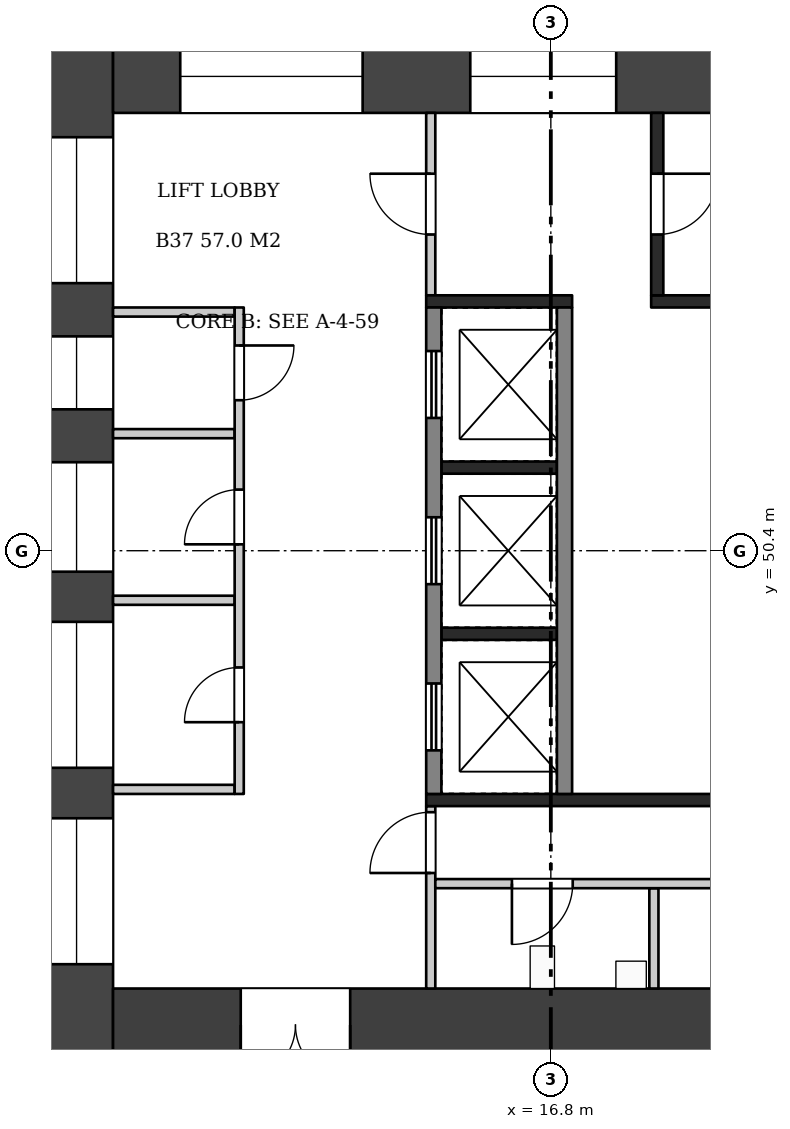
"""IFC4 building model, lengths in metres.
Left out: names, types, materials, properties, quantities, classifications, styles, units other than length and angle.
Written with IfcOpenShell. Run it as: python <this file> out.ifc"""

import sys

from ifc_helpers import new_model, si_unit, direction, frame, frame_2d, origin, place, context, subcontext, project, spatial, rectangle, extrude, element, fill, save


model = new_model("IFC4")
c1 = context("Model", 3, precision=1e-05, world=origin(), true_north=direction((0.0, 1.0)))
c2 = subcontext(c1, "Body", "Model", "MODEL_VIEW")
j1 = project(units=[si_unit("LENGTHUNIT", "METRE"), si_unit("PLANEANGLEUNIT", "RADIAN")], contexts=[c1])
p1 = place(None, origin())
s1 = spatial("IfcSite", under=j1, at=p1, CompositionType="ELEMENT")
p2 = place(p1, origin())
s2 = spatial("IfcBuilding", under=s1, at=p2, CompositionType="ELEMENT")
p3 = place(p2, frame((0.0, 0.0, 147.7)))
s3 = spatial("IfcBuildingStorey", under=s2, at=p3, CompositionType="ELEMENT", Elevation=147.7)
p4 = place(p3, frame((9.0, 58.8, 0.0), z_axis=(0.0, 0.0, 1.0), x_axis=(0.0, -1.0, 0.0)))
e1 = element("IfcWall", 1, at=p4, inside=s3, PredefinedType="SHEAR", context=c2, shape_type="SweptSolid", body=[
    extrude(rectangle(XDim=16.8, YDim=1.2, at=frame_2d((8.4, 0.0))), origin(), (0.0, 0.0, 1.0), 3.22),
])
p5 = place(p4, frame((1.6, 0.0, 0.6)))
e2 = element("IfcOpeningElement", 2, at=p5, cuts=e1, PredefinedType="OPENING", context=c2, shape_type="SweptSolid", body=[
    extrude(rectangle(XDim=2.4, YDim=2.1, at=frame_2d((1.2, 1.05))), frame((0.0, 0.61, 0.0), z_axis=(0.0, -1.0, 0.0), x_axis=(1.0, 0.0, 0.0)), (0.0, 0.0, 1.0), 1.22),
])
p6 = place(p4, frame((4.875, 0.0, 1.6)))
e3 = element("IfcOpeningElement", 3, at=p6, cuts=e1, PredefinedType="OPENING", context=c2, shape_type="SweptSolid", body=[
    extrude(rectangle(XDim=1.2, YDim=1.2, at=frame_2d((0.6, 0.6))), frame((0.0, 0.61, 0.0), z_axis=(0.0, -1.0, 0.0), x_axis=(1.0, 0.0, 0.0)), (0.0, 0.0, 1.0), 1.22),
])
p7 = place(p4, frame((6.945, 0.0, 1.6)))
e4 = element("IfcOpeningElement", 4, at=p7, cuts=e1, PredefinedType="OPENING", context=c2, shape_type="SweptSolid", body=[
    extrude(rectangle(XDim=1.8, YDim=1.2, at=frame_2d((0.9, 0.6))), frame((0.0, 0.61, 0.0), z_axis=(0.0, -1.0, 0.0), x_axis=(1.0, 0.0, 0.0)), (0.0, 0.0, 1.0), 1.22),
])
p8 = place(p4, frame((9.57, 0.0, 1.6)))
e5 = element("IfcOpeningElement", 5, at=p8, cuts=e1, PredefinedType="OPENING", context=c2, shape_type="SweptSolid", body=[
    extrude(rectangle(XDim=2.4, YDim=1.2, at=frame_2d((1.2, 0.6))), frame((0.0, 0.61, 0.0), z_axis=(0.0, -1.0, 0.0), x_axis=(1.0, 0.0, 0.0)), (0.0, 0.0, 1.0), 1.22),
])
p9 = place(p4, frame((12.8, 0.0, 0.6)))
e6 = element("IfcOpeningElement", 6, at=p9, cuts=e1, PredefinedType="OPENING", context=c2, shape_type="SweptSolid", body=[
    extrude(rectangle(XDim=2.4, YDim=2.1, at=frame_2d((1.2, 1.05))), frame((0.0, 0.61, 0.0), z_axis=(0.0, -1.0, 0.0), x_axis=(1.0, 0.0, 0.0)), (0.0, 0.0, 1.0), 1.22),
])
p10 = place(p3, frame((9.6, 58.2, 0.0), z_axis=(0.0, 0.0, 1.0), x_axis=(1.0, 0.0, 0.0)))
e7 = element("IfcWall", 7, at=p10, inside=s3, PredefinedType="SHEAR", context=c2, shape_type="SweptSolid", body=[
    extrude(rectangle(XDim=14.4, YDim=1.2, at=frame_2d((7.2, 0.0))), origin(), (0.0, 0.0, 1.0), 3.22),
])
p11 = place(p10, frame((1.105, 0.0, 0.6)))
e8 = element("IfcOpeningElement", 8, at=p11, cuts=e7, PredefinedType="OPENING", context=c2, shape_type="SweptSolid", body=[
    extrude(rectangle(XDim=3.0, YDim=2.1, at=frame_2d((1.5, 1.05))), frame((0.0, 0.61, 0.0), z_axis=(0.0, -1.0, 0.0), x_axis=(1.0, 0.0, 0.0)), (0.0, 0.0, 1.0), 1.22),
])
p12 = place(p10, frame((5.875, 0.0, 0.6)))
e9 = element("IfcOpeningElement", 9, at=p12, cuts=e7, PredefinedType="OPENING", context=c2, shape_type="SweptSolid", body=[
    extrude(rectangle(XDim=2.4, YDim=2.1, at=frame_2d((1.2, 1.05))), frame((0.0, 0.61, 0.0), z_axis=(0.0, -1.0, 0.0), x_axis=(1.0, 0.0, 0.0)), (0.0, 0.0, 1.0), 1.22),
])
p13 = place(p10, frame((9.993, 0.0, 0.5)))
e10 = element("IfcOpeningElement", 10, at=p13, cuts=e7, PredefinedType="OPENING", context=c2, shape_type="SweptSolid", body=[
    extrude(rectangle(XDim=1.2, YDim=2.4, at=frame_2d((0.6, 1.2))), frame((0.0, 0.61, 0.0), z_axis=(0.0, -1.0, 0.0), x_axis=(1.0, 0.0, 0.0)), (0.0, 0.0, 1.0), 1.22),
])
p14 = place(p10, frame((12.197, 0.0, 0.5)))
e11 = element("IfcOpeningElement", 11, at=p14, cuts=e7, PredefinedType="OPENING", context=c2, shape_type="SweptSolid", body=[
    extrude(rectangle(XDim=1.2, YDim=2.4, at=frame_2d((0.6, 1.2))), frame((0.0, 0.61, 0.0), z_axis=(0.0, -1.0, 0.0), x_axis=(1.0, 0.0, 0.0)), (0.0, 0.0, 1.0), 1.22),
])
p15 = place(p3, frame((9.6, 42.6, 0.0), z_axis=(0.0, 0.0, 1.0), x_axis=(1.0, 0.0, 0.0)))
e12 = element("IfcWall", 12, at=p15, inside=s3, PredefinedType="SHEAR", context=c2, shape_type="SweptSolid", body=[
    extrude(rectangle(XDim=14.4, YDim=1.2, at=frame_2d((7.2, 0.0))), origin(), (0.0, 0.0, 1.0), 3.22),
])
p16 = place(p15, frame((2.1, 0.0, 0.0)))
e13 = element("IfcOpeningElement", 13, at=p16, cuts=e12, PredefinedType="OPENING", context=c2, shape_type="SweptSolid", body=[
    extrude(rectangle(XDim=1.8, YDim=2.1, at=frame_2d((0.9, 1.05))), frame((0.0, 0.61, 0.0), z_axis=(0.0, -1.0, 0.0), x_axis=(1.0, 0.0, 0.0)), (0.0, 0.0, 1.0), 1.22),
])
for number, where, z_axis, x_axis in (
    (14, (9.6, 54.325, 0.0), (0.0, 0.0, 1.0), (1.0, 0.0, 0.0)),
    (15, (9.6, 46.475, 0.0), (0.0, 0.0, 1.0), (1.0, 0.0, 0.0)),
    (16, (9.6, 52.325, 0.0), (0.0, 0.0, 1.0), (1.0, 0.0, 0.0)),
    (17, (9.6, 49.585, 0.0), (0.0, 0.0, 1.0), (1.0, 0.0, 0.0)),
):
    element("IfcWall", number, at=place(p3, frame(where, z_axis=z_axis, x_axis=x_axis)), inside=s3, PredefinedType="PARTITIONING", context=c2, shape_type="SweptSolid", body=[
        extrude(rectangle(XDim=2.0, YDim=0.15, at=frame_2d((1.0, 0.0))), origin(), (0.0, 0.0, 1.0), 3.22),
    ])
p17 = place(p3, frame((11.675, 54.4, 0.0), z_axis=(0.0, 0.0, 1.0), x_axis=(0.0, -1.0, 0.0)))
e18 = element("IfcWall", 18, at=p17, inside=s3, PredefinedType="PARTITIONING", context=c2, shape_type="SweptSolid", body=[
    extrude(rectangle(XDim=8.0, YDim=0.15, at=frame_2d((4.0, 0.0))), origin(), (0.0, 0.0, 1.0), 3.22),
])
p18 = place(p17, frame((0.625, 0.0, 0.0)))
e19 = element("IfcOpeningElement", 19, at=p18, cuts=e18, PredefinedType="OPENING", context=c2, shape_type="SweptSolid", body=[
    extrude(rectangle(XDim=0.9, YDim=2.1, at=frame_2d((0.45, 1.05))), frame((0.0, 0.085, 0.0), z_axis=(0.0, -1.0, 0.0), x_axis=(1.0, 0.0, 0.0)), (0.0, 0.0, 1.0), 0.17),
])
p19 = place(p17, frame((2.995, 0.0, 0.0)))
e20 = element("IfcOpeningElement", 20, at=p19, cuts=e18, PredefinedType="OPENING", context=c2, shape_type="SweptSolid", body=[
    extrude(rectangle(XDim=0.9, YDim=2.1, at=frame_2d((0.45, 1.05))), frame((0.0, 0.085, 0.0), z_axis=(0.0, -1.0, 0.0), x_axis=(1.0, 0.0, 0.0)), (0.0, 0.0, 1.0), 0.17),
])
p20 = place(p17, frame((5.92, 0.0, 0.0)))
e21 = element("IfcOpeningElement", 21, at=p20, cuts=e18, PredefinedType="OPENING", context=c2, shape_type="SweptSolid", body=[
    extrude(rectangle(XDim=0.9, YDim=2.1, at=frame_2d((0.45, 1.05))), frame((0.0, 0.085, 0.0), z_axis=(0.0, -1.0, 0.0), x_axis=(1.0, 0.0, 0.0)), (0.0, 0.0, 1.0), 0.17),
])
for number, where, z_axis, x_axis in (
    (22, (15.0, 51.767, 0.0), (0.0, 0.0, 1.0), (1.0, 0.0, 0.0)),
    (23, (15.0, 49.033, 0.0), (0.0, 0.0, 1.0), (1.0, 0.0, 0.0)),
):
    element("IfcWall", number, at=place(p3, frame(where, z_axis=z_axis, x_axis=x_axis)), inside=s3, PredefinedType="SHEAR", context=c2, shape_type="SweptSolid", body=[
        extrude(rectangle(XDim=1.9, YDim=0.2, at=frame_2d((0.95, 0.0))), origin(), (0.0, 0.0, 1.0), 3.22),
    ])
p21 = place(p3, frame((14.875, 54.4, 0.0), z_axis=(0.0, 0.0, 1.0), x_axis=(0.0, -1.0, 0.0)))
e24 = element("IfcWall", 24, at=p21, inside=s3, PredefinedType="SHEAR", context=c2, shape_type="SweptSolid", body=[
    extrude(rectangle(XDim=8.0, YDim=0.25, at=frame_2d((4.0, 0.0))), origin(), (0.0, 0.0, 1.0), 3.22),
])
p22 = place(p21, frame((0.717, 0.0, 0.0)))
e25 = element("IfcOpeningElement", 25, at=p22, cuts=e24, PredefinedType="OPENING", context=c2, shape_type="SweptSolid", body=[
    extrude(rectangle(XDim=1.1, YDim=2.1, at=frame_2d((0.55, 1.05))), frame((0.0, 0.135, 0.0), z_axis=(0.0, -1.0, 0.0), x_axis=(1.0, 0.0, 0.0)), (0.0, 0.0, 1.0), 0.27),
])
p23 = place(p21, frame((3.45, 0.0, 0.0)))
e26 = element("IfcOpeningElement", 26, at=p23, cuts=e24, PredefinedType="OPENING", context=c2, shape_type="SweptSolid", body=[
    extrude(rectangle(XDim=1.1, YDim=2.1, at=frame_2d((0.55, 1.05))), frame((0.0, 0.135, 0.0), z_axis=(0.0, -1.0, 0.0), x_axis=(1.0, 0.0, 0.0)), (0.0, 0.0, 1.0), 0.27),
])
p24 = place(p21, frame((6.183, 0.0, 0.0)))
e27 = element("IfcOpeningElement", 27, at=p24, cuts=e24, PredefinedType="OPENING", context=c2, shape_type="SweptSolid", body=[
    extrude(rectangle(XDim=1.1, YDim=2.1, at=frame_2d((0.55, 1.05))), frame((0.0, 0.135, 0.0), z_axis=(0.0, -1.0, 0.0), x_axis=(1.0, 0.0, 0.0)), (0.0, 0.0, 1.0), 0.27),
])
p25 = place(p3, frame((17.025, 54.4, 0.0), z_axis=(0.0, 0.0, 1.0), x_axis=(0.0, -1.0, 0.0)))
e28 = element("IfcWall", 28, at=p25, inside=s3, PredefinedType="SHEAR", context=c2, shape_type="SweptSolid", body=[
    extrude(rectangle(XDim=8.0, YDim=0.25, at=frame_2d((4.0, 0.0))), origin(), (0.0, 0.0, 1.0), 3.22),
])
p26 = place(p3, frame((14.75, 54.5, 0.0), z_axis=(0.0, 0.0, 1.0), x_axis=(1.0, 0.0, 0.0)))
e29 = element("IfcWall", 29, at=p26, inside=s3, PredefinedType="SHEAR", context=c2, shape_type="SweptSolid", body=[
    extrude(rectangle(XDim=2.4, YDim=0.2, at=frame_2d((1.2, 0.0))), origin(), (0.0, 0.0, 1.0), 3.22),
])
p27 = place(p3, frame((18.45, 54.5, 0.0), z_axis=(0.0, 0.0, 1.0), x_axis=(1.0, 0.0, 0.0)))
e30 = element("IfcWall", 30, at=p27, inside=s3, PredefinedType="SHEAR", context=c2, shape_type="SweptSolid", body=[
    extrude(rectangle(XDim=5.55, YDim=0.2, at=frame_2d((2.775, 0.0))), origin(), (0.0, 0.0, 1.0), 3.22),
])
p28 = place(p3, frame((14.825, 57.6, 0.0), z_axis=(0.0, 0.0, 1.0), x_axis=(0.0, -1.0, 0.0)))
e31 = element("IfcWall", 31, at=p28, inside=s3, PredefinedType="PARTITIONING", context=c2, shape_type="SweptSolid", body=[
    extrude(rectangle(XDim=3.0, YDim=0.15, at=frame_2d((1.5, 0.0))), origin(), (0.0, 0.0, 1.0), 3.22),
])
p29 = place(p28, frame((1.0, 0.0, 0.0)))
e32 = element("IfcOpeningElement", 32, at=p29, cuts=e31, PredefinedType="OPENING", context=c2, shape_type="SweptSolid", body=[
    extrude(rectangle(XDim=1.0, YDim=2.1, at=frame_2d((0.5, 1.05))), frame((0.0, 0.085, 0.0), z_axis=(0.0, -1.0, 0.0), x_axis=(1.0, 0.0, 0.0)), (0.0, 0.0, 1.0), 0.17),
])
p30 = place(p3, frame((18.55, 57.6, 0.0), z_axis=(0.0, 0.0, 1.0), x_axis=(0.0, -1.0, 0.0)))
e33 = element("IfcWall", 33, at=p30, inside=s3, PredefinedType="SHEAR", context=c2, shape_type="SweptSolid", body=[
    extrude(rectangle(XDim=3.0, YDim=0.2, at=frame_2d((1.5, 0.0))), origin(), (0.0, 0.0, 1.0), 3.22),
])
p31 = place(p30, frame((1.0, 0.0, 0.0)))
e34 = element("IfcOpeningElement", 34, at=p31, cuts=e33, PredefinedType="OPENING", context=c2, shape_type="SweptSolid", body=[
    extrude(rectangle(XDim=1.0, YDim=2.1, at=frame_2d((0.5, 1.05))), frame((0.0, 0.11, 0.0), z_axis=(0.0, -1.0, 0.0), x_axis=(1.0, 0.0, 0.0)), (0.0, 0.0, 1.0), 0.22),
])
p32 = place(p3, frame((14.75, 46.3, 0.0), z_axis=(0.0, 0.0, 1.0), x_axis=(1.0, 0.0, 0.0)))
e35 = element("IfcWall", 35, at=p32, inside=s3, PredefinedType="SHEAR", context=c2, shape_type="SweptSolid", body=[
    extrude(rectangle(XDim=9.25, YDim=0.2, at=frame_2d((4.625, 0.0))), origin(), (0.0, 0.0, 1.0), 3.22),
])
p33 = place(p3, frame((14.825, 46.2, 0.0), z_axis=(0.0, 0.0, 1.0), x_axis=(0.0, -1.0, 0.0)))
e36 = element("IfcWall", 36, at=p33, inside=s3, PredefinedType="PARTITIONING", context=c2, shape_type="SweptSolid", body=[
    extrude(rectangle(XDim=3.0, YDim=0.15, at=frame_2d((1.5, 0.0))), origin(), (0.0, 0.0, 1.0), 3.22),
])
p34 = place(p33, frame((0.1, 0.0, 0.0)))
e37 = element("IfcOpeningElement", 37, at=p34, cuts=e36, PredefinedType="OPENING", context=c2, shape_type="SweptSolid", body=[
    extrude(rectangle(XDim=1.0, YDim=2.1, at=frame_2d((0.5, 1.05))), frame((0.0, 0.085, 0.0), z_axis=(0.0, -1.0, 0.0), x_axis=(1.0, 0.0, 0.0)), (0.0, 0.0, 1.0), 0.17),
])
p35 = place(p3, frame((18.495, 44.85, 0.0), z_axis=(0.0, 0.0, 1.0), x_axis=(0.0, -1.0, 0.0)))
e38 = element("IfcWall", 38, at=p35, inside=s3, PredefinedType="PARTITIONING", context=c2, shape_type="SweptSolid", body=[
    extrude(rectangle(XDim=1.65, YDim=0.15, at=frame_2d((0.825, 0.0))), origin(), (0.0, 0.0, 1.0), 3.22),
])
p36 = place(p3, frame((14.9, 44.925, 0.0), z_axis=(0.0, 0.0, 1.0), x_axis=(1.0, 0.0, 0.0)))
e39 = element("IfcWall", 39, at=p36, inside=s3, PredefinedType="PARTITIONING", context=c2, shape_type="SweptSolid", body=[
    extrude(rectangle(XDim=9.1, YDim=0.15, at=frame_2d((4.55, 0.0))), origin(), (0.0, 0.0, 1.0), 3.22),
])
p37 = place(p36, frame((1.26, 0.0, 0.0)))
e40 = element("IfcOpeningElement", 40, at=p37, cuts=e39, PredefinedType="OPENING", context=c2, shape_type="SweptSolid", body=[
    extrude(rectangle(XDim=1.0, YDim=2.1, at=frame_2d((0.5, 1.05))), frame((0.0, 0.085, 0.0), z_axis=(0.0, -1.0, 0.0), x_axis=(1.0, 0.0, 0.0)), (0.0, 0.0, 1.0), 0.17),
])
p38 = place(p36, frame((4.54, 0.0, 0.0)))
e41 = element("IfcOpeningElement", 41, at=p38, cuts=e39, PredefinedType="OPENING", context=c2, shape_type="SweptSolid", body=[
    extrude(rectangle(XDim=0.9, YDim=2.1, at=frame_2d((0.45, 1.05))), frame((0.0, 0.085, 0.0), z_axis=(0.0, -1.0, 0.0), x_axis=(1.0, 0.0, 0.0)), (0.0, 0.0, 1.0), 0.17),
])
p39 = place(p36, frame((7.33, 0.0, 0.0)))
e42 = element("IfcOpeningElement", 42, at=p39, cuts=e39, PredefinedType="OPENING", context=c2, shape_type="SweptSolid", body=[
    extrude(rectangle(XDim=0.9, YDim=2.1, at=frame_2d((0.45, 1.05))), frame((0.0, 0.085, 0.0), z_axis=(0.0, -1.0, 0.0), x_axis=(1.0, 0.0, 0.0)), (0.0, 0.0, 1.0), 0.17),
])
p40 = place(p16, frame((1.8, 0.0, 0.0), z_axis=(0.0, 0.0, 1.0), x_axis=(-1.0, 0.0, 0.0)))
e43 = element("IfcDoor", 43, at=p40, inside=s3, OperationType="DOUBLE_DOOR_SINGLE_SWING", PredefinedType="DOOR", context=c2, shape_type="SweptSolid", body=[
    extrude(rectangle(XDim=1.8, YDim=2.1, at=frame_2d((0.9, 1.05))), frame((0.0, 0.025, 0.0), z_axis=(0.0, -1.0, 0.0), x_axis=(1.0, 0.0, 0.0)), (0.0, 0.0, 1.0), 0.05),
])
fill(e13, e43)
p41 = place(p18, origin())
e44 = element("IfcDoor", 44, at=p41, inside=s3, OperationType="SINGLE_SWING_LEFT", PredefinedType="DOOR", context=c2, shape_type="SweptSolid", body=[
    extrude(rectangle(XDim=0.9, YDim=2.1, at=frame_2d((0.45, 1.05))), frame((0.0, 0.025, 0.0), z_axis=(0.0, -1.0, 0.0), x_axis=(1.0, 0.0, 0.0)), (0.0, 0.0, 1.0), 0.05),
])
fill(e19, e44)
p42 = place(p19, frame((0.9, 0.0, 0.0), z_axis=(0.0, 0.0, 1.0), x_axis=(-1.0, 0.0, 0.0)))
e45 = element("IfcDoor", 45, at=p42, inside=s3, OperationType="SINGLE_SWING_LEFT", PredefinedType="DOOR", context=c2, shape_type="SweptSolid", body=[
    extrude(rectangle(XDim=0.9, YDim=2.1, at=frame_2d((0.45, 1.05))), frame((0.0, 0.025, 0.0), z_axis=(0.0, -1.0, 0.0), x_axis=(1.0, 0.0, 0.0)), (0.0, 0.0, 1.0), 0.05),
])
fill(e20, e45)
p43 = place(p20, frame((0.9, 0.0, 0.0), z_axis=(0.0, 0.0, 1.0), x_axis=(-1.0, 0.0, 0.0)))
e46 = element("IfcDoor", 46, at=p43, inside=s3, OperationType="SINGLE_SWING_LEFT", PredefinedType="DOOR", context=c2, shape_type="SweptSolid", body=[
    extrude(rectangle(XDim=0.9, YDim=2.1, at=frame_2d((0.45, 1.05))), frame((0.0, 0.025, 0.0), z_axis=(0.0, -1.0, 0.0), x_axis=(1.0, 0.0, 0.0)), (0.0, 0.0, 1.0), 0.05),
])
fill(e21, e46)
p44 = place(p22, origin())
e47 = element("IfcDoor", 47, at=p44, inside=s3, OperationType="DOUBLE_DOOR_SLIDING", PredefinedType="DOOR", context=c2, shape_type="SweptSolid", body=[
    extrude(rectangle(XDim=1.1, YDim=2.1, at=frame_2d((0.55, 1.05))), frame((0.0, 0.025, 0.0), z_axis=(0.0, -1.0, 0.0), x_axis=(1.0, 0.0, 0.0)), (0.0, 0.0, 1.0), 0.05),
])
fill(e25, e47)
p45 = place(p23, origin())
e48 = element("IfcDoor", 48, at=p45, inside=s3, OperationType="DOUBLE_DOOR_SLIDING", PredefinedType="DOOR", context=c2, shape_type="SweptSolid", body=[
    extrude(rectangle(XDim=1.1, YDim=2.1, at=frame_2d((0.55, 1.05))), frame((0.0, 0.025, 0.0), z_axis=(0.0, -1.0, 0.0), x_axis=(1.0, 0.0, 0.0)), (0.0, 0.0, 1.0), 0.05),
])
fill(e26, e48)
p46 = place(p24, origin())
e49 = element("IfcDoor", 49, at=p46, inside=s3, OperationType="DOUBLE_DOOR_SLIDING", PredefinedType="DOOR", context=c2, shape_type="SweptSolid", body=[
    extrude(rectangle(XDim=1.1, YDim=2.1, at=frame_2d((0.55, 1.05))), frame((0.0, 0.025, 0.0), z_axis=(0.0, -1.0, 0.0), x_axis=(1.0, 0.0, 0.0)), (0.0, 0.0, 1.0), 0.05),
])
fill(e27, e49)
p47 = place(p29, frame((1.0, 0.0, 0.0), z_axis=(0.0, 0.0, 1.0), x_axis=(-1.0, 0.0, 0.0)))
e50 = element("IfcDoor", 50, at=p47, inside=s3, OperationType="SINGLE_SWING_RIGHT", PredefinedType="DOOR", context=c2, shape_type="SweptSolid", body=[
    extrude(rectangle(XDim=1.0, YDim=2.1, at=frame_2d((0.5, 1.05))), frame((0.0, 0.025, 0.0), z_axis=(0.0, -1.0, 0.0), x_axis=(1.0, 0.0, 0.0)), (0.0, 0.0, 1.0), 0.05),
])
fill(e32, e50)
p48 = place(p31, origin())
e51 = element("IfcDoor", 51, at=p48, inside=s3, OperationType="SINGLE_SWING_LEFT", PredefinedType="DOOR", context=c2, shape_type="SweptSolid", body=[
    extrude(rectangle(XDim=1.0, YDim=2.1, at=frame_2d((0.5, 1.05))), frame((0.0, 0.025, 0.0), z_axis=(0.0, -1.0, 0.0), x_axis=(1.0, 0.0, 0.0)), (0.0, 0.0, 1.0), 0.05),
])
fill(e34, e51)
p49 = place(p34, frame((1.0, 0.0, 0.0), z_axis=(0.0, 0.0, 1.0), x_axis=(-1.0, 0.0, 0.0)))
e52 = element("IfcDoor", 52, at=p49, inside=s3, OperationType="SINGLE_SWING_LEFT", PredefinedType="DOOR", context=c2, shape_type="SweptSolid", body=[
    extrude(rectangle(XDim=1.0, YDim=2.1, at=frame_2d((0.5, 1.05))), frame((0.0, 0.025, 0.0), z_axis=(0.0, -1.0, 0.0), x_axis=(1.0, 0.0, 0.0)), (0.0, 0.0, 1.0), 0.05),
])
fill(e37, e52)
p50 = place(p37, frame((1.0, 0.0, 0.0), z_axis=(0.0, 0.0, 1.0), x_axis=(-1.0, 0.0, 0.0)))
e53 = element("IfcDoor", 53, at=p50, inside=s3, OperationType="SINGLE_SWING_RIGHT", PredefinedType="DOOR", context=c2, shape_type="SweptSolid", body=[
    extrude(rectangle(XDim=1.0, YDim=2.1, at=frame_2d((0.5, 1.05))), frame((0.0, 0.025, 0.0), z_axis=(0.0, -1.0, 0.0), x_axis=(1.0, 0.0, 0.0)), (0.0, 0.0, 1.0), 0.05),
])
fill(e40, e53)
p51 = place(p5, origin())
e54 = element("IfcWindow", 54, at=p51, inside=s3, PartitioningType="SINGLE_PANEL", PredefinedType="WINDOW", context=c2, shape_type="SweptSolid", body=[
    extrude(rectangle(XDim=2.4, YDim=2.1, at=frame_2d((1.2, 1.05))), frame((0.0, 0.03, 0.0), z_axis=(0.0, -1.0, 0.0), x_axis=(1.0, 0.0, 0.0)), (0.0, 0.0, 1.0), 0.06),
])
fill(e2, e54)
p52 = place(p6, origin())
e55 = element("IfcWindow", 55, at=p52, inside=s3, PartitioningType="SINGLE_PANEL", PredefinedType="WINDOW", context=c2, shape_type="SweptSolid", body=[
    extrude(rectangle(XDim=1.2, YDim=1.2, at=frame_2d((0.6, 0.6))), frame((0.0, 0.03, 0.0), z_axis=(0.0, -1.0, 0.0), x_axis=(1.0, 0.0, 0.0)), (0.0, 0.0, 1.0), 0.06),
])
fill(e3, e55)
p53 = place(p7, origin())
e56 = element("IfcWindow", 56, at=p53, inside=s3, PartitioningType="SINGLE_PANEL", PredefinedType="WINDOW", context=c2, shape_type="SweptSolid", body=[
    extrude(rectangle(XDim=1.8, YDim=1.2, at=frame_2d((0.9, 0.6))), frame((0.0, 0.03, 0.0), z_axis=(0.0, -1.0, 0.0), x_axis=(1.0, 0.0, 0.0)), (0.0, 0.0, 1.0), 0.06),
])
fill(e4, e56)
p54 = place(p8, origin())
e57 = element("IfcWindow", 57, at=p54, inside=s3, PartitioningType="SINGLE_PANEL", PredefinedType="WINDOW", context=c2, shape_type="SweptSolid", body=[
    extrude(rectangle(XDim=2.4, YDim=1.2, at=frame_2d((1.2, 0.6))), frame((0.0, 0.03, 0.0), z_axis=(0.0, -1.0, 0.0), x_axis=(1.0, 0.0, 0.0)), (0.0, 0.0, 1.0), 0.06),
])
fill(e5, e57)
p55 = place(p9, origin())
e58 = element("IfcWindow", 58, at=p55, inside=s3, PartitioningType="SINGLE_PANEL", PredefinedType="WINDOW", context=c2, shape_type="SweptSolid", body=[
    extrude(rectangle(XDim=2.4, YDim=2.1, at=frame_2d((1.2, 1.05))), frame((0.0, 0.03, 0.0), z_axis=(0.0, -1.0, 0.0), x_axis=(1.0, 0.0, 0.0)), (0.0, 0.0, 1.0), 0.06),
])
fill(e6, e58)
p56 = place(p11, origin())
e59 = element("IfcWindow", 59, at=p56, inside=s3, PartitioningType="SINGLE_PANEL", PredefinedType="WINDOW", context=c2, shape_type="SweptSolid", body=[
    extrude(rectangle(XDim=3.0, YDim=2.1, at=frame_2d((1.5, 1.05))), frame((0.0, 0.03, 0.0), z_axis=(0.0, -1.0, 0.0), x_axis=(1.0, 0.0, 0.0)), (0.0, 0.0, 1.0), 0.06),
])
fill(e8, e59)
p57 = place(p12, origin())
e60 = element("IfcWindow", 60, at=p57, inside=s3, PartitioningType="SINGLE_PANEL", PredefinedType="WINDOW", context=c2, shape_type="SweptSolid", body=[
    extrude(rectangle(XDim=2.4, YDim=2.1, at=frame_2d((1.2, 1.05))), frame((0.0, 0.03, 0.0), z_axis=(0.0, -1.0, 0.0), x_axis=(1.0, 0.0, 0.0)), (0.0, 0.0, 1.0), 0.06),
])
fill(e9, e60)
save(model, sys.argv[1])
